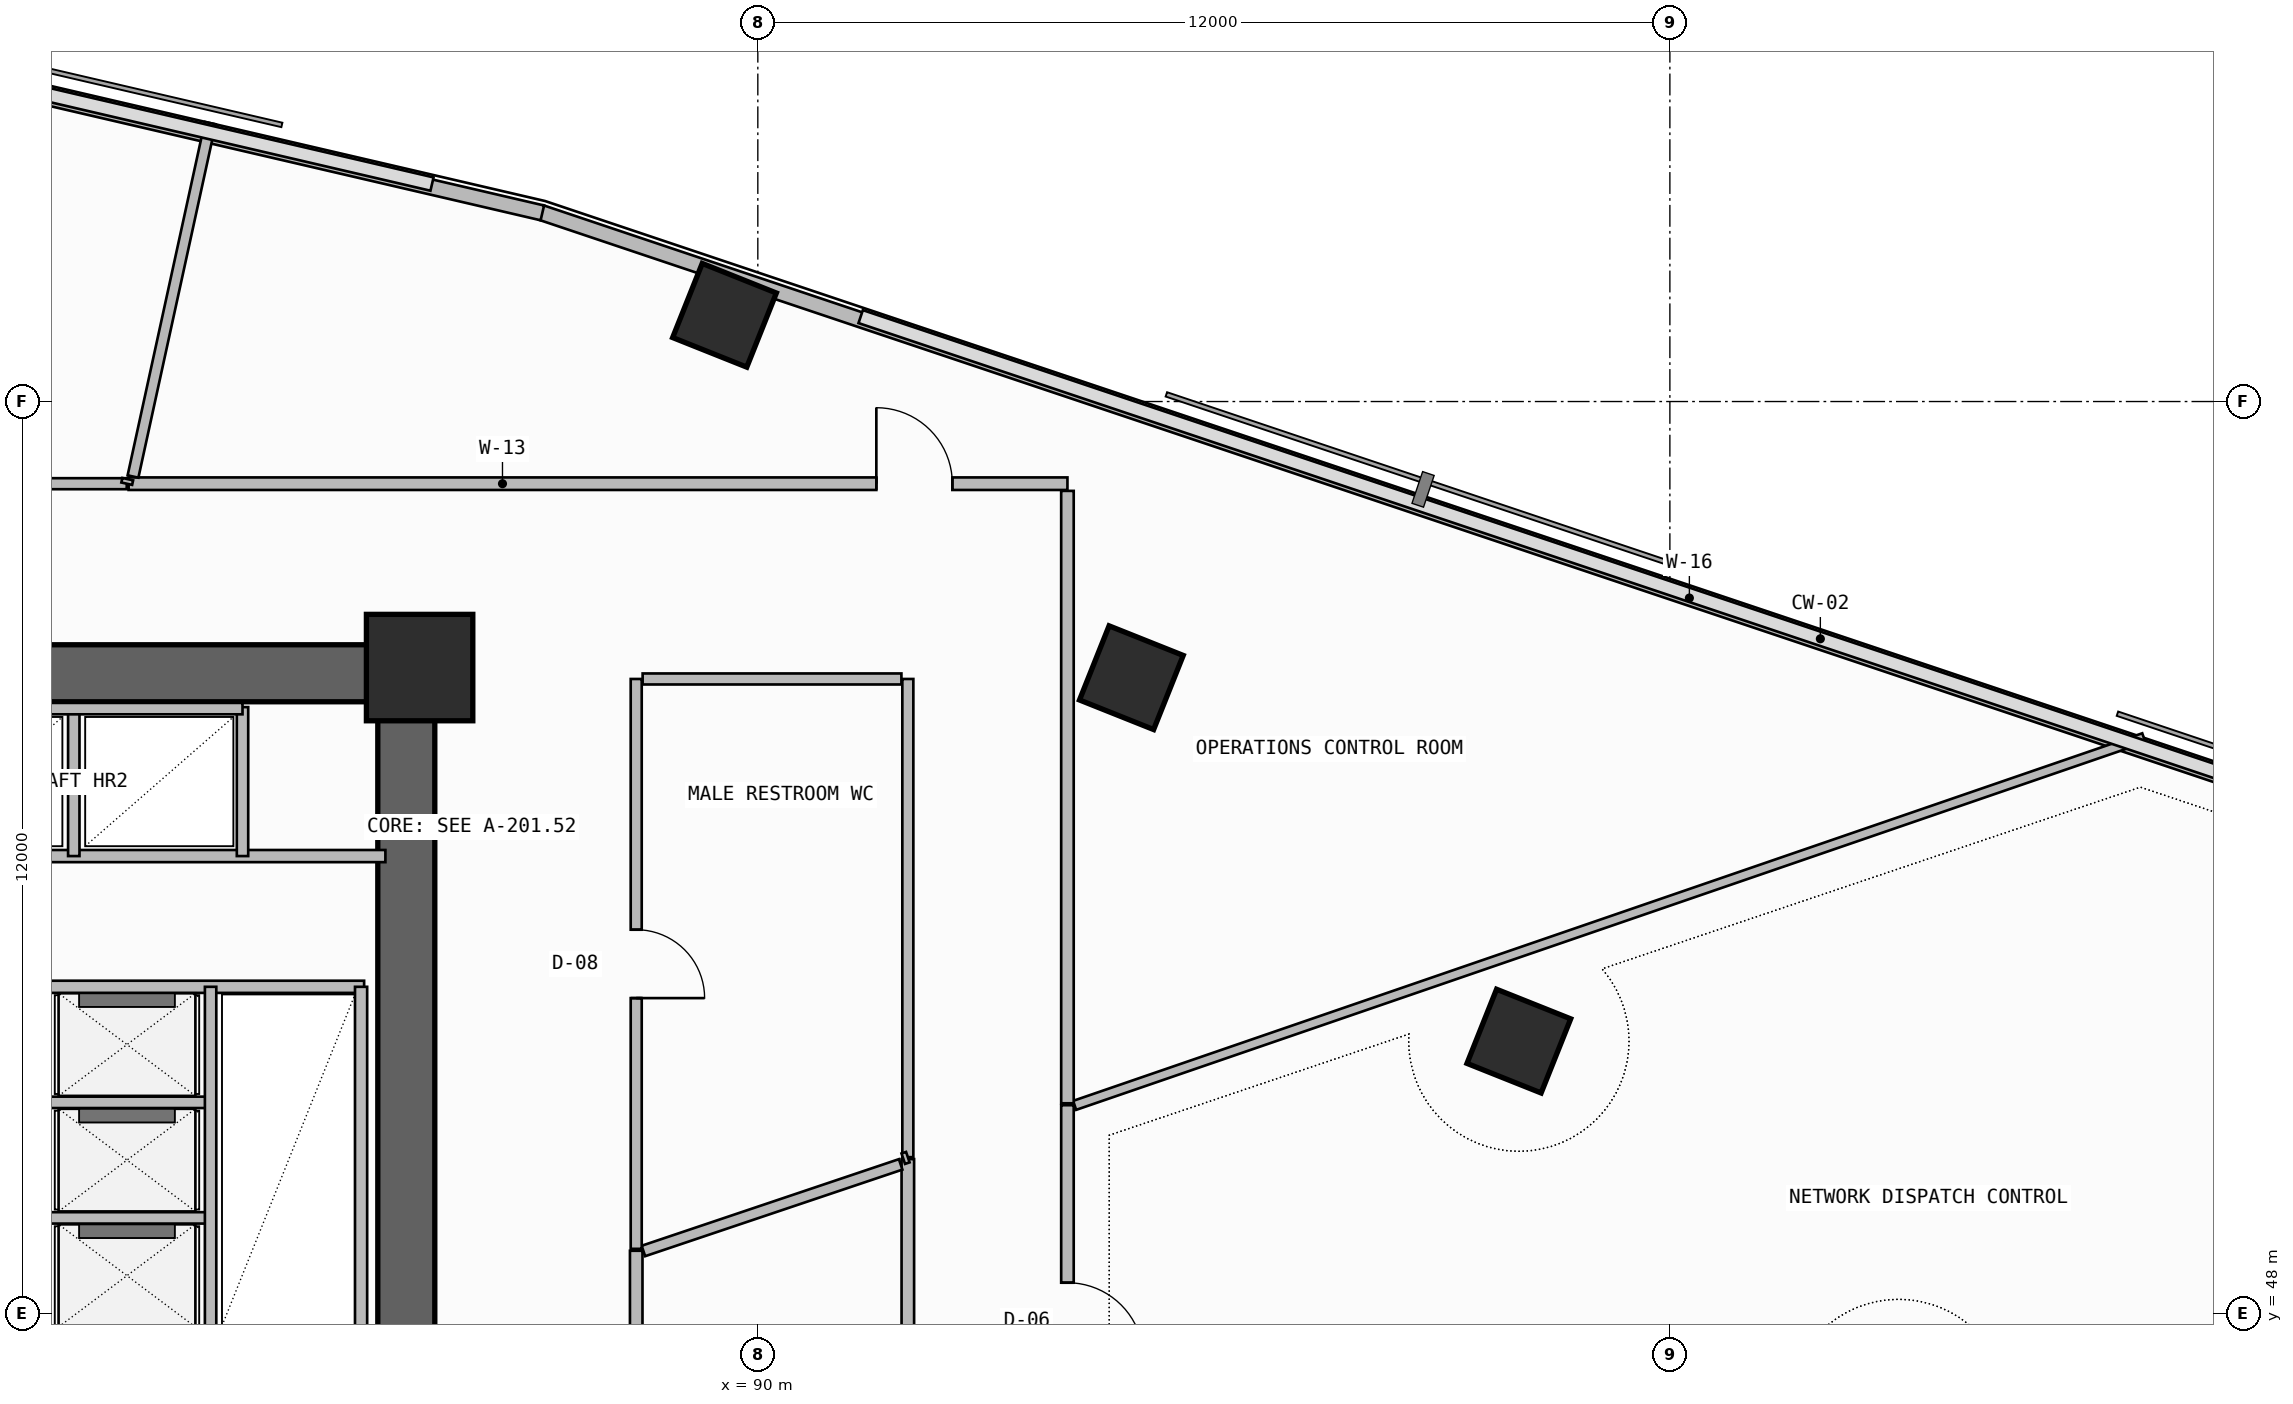
"""IFC4 building model, lengths in metres.
Left out: names, types, materials, properties, quantities, classifications, styles, units other than length and angle.
Written with IfcOpenShell. Run it as: python <this file> out.ifc"""

import sys

from ifc_helpers import new_model, si_unit, direction, frame, frame_2d, origin, origin_2d, place, context, subcontext, project, spatial, rectangle, extrude, element, fill, save


model = new_model("IFC4")
c1 = context("Model", 3, precision=1e-05, world=origin(), true_north=direction((0.0, 1.0)))
c2 = subcontext(c1, "Body", "Model", "MODEL_VIEW")
j1 = project(units=[si_unit("LENGTHUNIT", "METRE"), si_unit("PLANEANGLEUNIT", "RADIAN")], contexts=[c1])
p1 = place(None, origin())
s1 = spatial("IfcSite", under=j1, at=p1, CompositionType="ELEMENT")
p2 = place(p1, origin())
s2 = spatial("IfcBuilding", under=s1, at=p2, CompositionType="ELEMENT")
p3 = place(p2, frame((0.0, 0.0, 186.14)))
s3 = spatial("IfcBuildingStorey", under=s2, at=p3, CompositionType="ELEMENT", Elevation=186.14)
p4 = place(p3, frame((72.0, 56.425, -0.26), z_axis=(0.0, 0.0, 1.0), x_axis=(1.0, 0.0, 0.0)))
e1 = element("IfcWall", 1, at=p4, inside=s3, PredefinedType="SHEAR", context=c2, shape_type="SweptSolid", body=[
    extrude(rectangle(XDim=13.75, YDim=0.75, at=frame_2d((6.875, 0.0))), origin(), (0.0, 0.0, 1.0), 3.52),
])
p5 = place(p3, frame((85.375, 47.6, -0.26), z_axis=(0.0, 0.0, 1.0), x_axis=(0.0, 1.0, 0.0)))
e2 = element("IfcWall", 2, at=p5, inside=s3, PredefinedType="SHEAR", context=c2, shape_type="SweptSolid", body=[
    extrude(rectangle(XDim=8.45, YDim=0.75, at=frame_2d((4.225, 0.0))), origin(), (0.0, 0.0, 1.0), 3.52),
])
p6 = place(p3, frame((85.55, 56.5, 0.0), z_axis=(0.0, 0.0, 1.0), x_axis=(1.0, 0.0, 0.0)))
e3 = element("IfcColumn", 3, at=p6, inside=s3, PredefinedType="COLUMN", context=c2, shape_type="SweptSolid", body=[
    extrude(rectangle(XDim=1.4, YDim=1.4, at=origin_2d()), origin(), (0.0, 0.0, 1.0), 3.52),
])
for number, where, z_axis, x_axis in (
    (4, (100.013, 51.585, 0.0), (0.0, 0.0, 1.0), (0.371, 0.929, 0.0)),
    (5, (94.915, 56.367, 0.0), (0.0, 0.0, 1.0), (0.371, 0.929, 0.0)),
    (6, (89.562, 61.135, 0.0), (0.0, 0.0, 1.0), (0.371, 0.929, 0.0)),
):
    element("IfcColumn", number, at=place(p3, frame(where, z_axis=z_axis, x_axis=x_axis)), inside=s3, PredefinedType="COLUMN", context=c2, shape_type="SweptSolid", body=[
        extrude(rectangle(XDim=1.05, YDim=1.05, at=origin_2d()), origin(), (0.0, 0.0, 1.0), 3.52),
    ])
p7 = place(p3, frame((104.656, 44.269, 0.0), z_axis=(0.0, 0.0, 1.0), x_axis=(0.918789071809, 0.394748833467, 0.0)))
e7 = element("IfcWall", 7, at=p7, inside=s3, PredefinedType="SOLIDWALL", context=c2, shape_type="SweptSolid", body=[
    extrude(rectangle(XDim=13.069, YDim=0.42, at=frame_2d((6.534, 0.0))), origin(), (0.0, 0.0, 1.0), 2.245),
])
p8 = place(p7, frame((2.362, 0.0, 1.2)))
e8 = element("IfcOpeningElement", 8, at=p8, cuts=e7, PredefinedType="OPENING", context=c2, shape_type="SweptSolid", body=[
    extrude(rectangle(XDim=2.4, YDim=0.9, at=frame_2d((1.2, 0.45))), frame((0.0, 0.22, 0.0), z_axis=(0.0, -1.0, 0.0), x_axis=(1.0, 0.0, 0.0)), (0.0, 0.0, 1.0), 0.44),
])
p9 = place(p3, frame((117.363, 52.344, 0.0), z_axis=(0.0, 0.0, 1.0), x_axis=(-0.94800468727, 0.31825636351, 0.0)))
e9 = element("IfcWall", 9, at=p9, inside=s3, PredefinedType="PARAPET", context=c2, shape_type="SweptSolid", body=[
    extrude(rectangle(XDim=31.869, YDim=0.2, at=frame_2d((15.935, 0.0))), origin(), (0.0, 0.0, 1.0), 1.15),
])
p10 = place(p3, frame((87.165, 62.482, 0.0), z_axis=(0.0, 0.0, 1.0), x_axis=(-0.973958631559, 0.226725790352, 0.0)))
e10 = element("IfcWall", 10, at=p10, inside=s3, PredefinedType="PARAPET", context=c2, shape_type="SweptSolid", body=[
    extrude(rectangle(XDim=27.376, YDim=0.2, at=frame_2d((13.688, 0.0))), origin(), (0.0, 0.0, 1.0), 1.15),
])
p11 = place(p3, frame((80.6, 52.3, 0.0), z_axis=(0.0, 0.0, 1.0), x_axis=(1.0, 0.0, 0.0)))
e11 = element("IfcWall", 11, at=p11, inside=s3, PredefinedType="SOLIDWALL", context=c2, shape_type="SweptSolid", body=[
    extrude(rectangle(XDim=4.22, YDim=0.16, at=frame_2d((2.11, 0.0))), origin(), (0.0, 0.0, 1.0), 3.26),
])
for number, where, z_axis, x_axis in (
    (12, (80.6, 49.26, 0.0), (0.0, 0.0, 1.0), (1.0, 0.0, 0.0)),
    (13, (80.6, 50.78, 0.0), (0.0, 0.0, 1.0), (1.0, 0.0, 0.0)),
):
    element("IfcWall", number, at=place(p3, frame(where, z_axis=z_axis, x_axis=x_axis)), inside=s3, PredefinedType="PLUMBINGWALL", context=c2, shape_type="SweptSolid", body=[
        extrude(rectangle(XDim=2.2, YDim=0.15, at=frame_2d((1.1, 0.0))), origin(), (0.0, 0.0, 1.0), 3.26),
    ])
p12 = place(p3, frame((82.8, 47.7, 0.0), z_axis=(0.0, 0.0, 1.0), x_axis=(0.0, 1.0, 0.0)))
e14 = element("IfcWall", 14, at=p12, inside=s3, PredefinedType="PLUMBINGWALL", context=c2, shape_type="SweptSolid", body=[
    extrude(rectangle(XDim=4.6, YDim=0.15, at=frame_2d((2.3, 0.0))), origin(), (0.0, 0.0, 1.0), 3.26),
])
p13 = place(p3, frame((84.78, 47.7, 0.0), z_axis=(0.0, 0.0, 1.0), x_axis=(0.0, 1.0, 0.0)))
e15 = element("IfcWall", 15, at=p13, inside=s3, PredefinedType="SOLIDWALL", context=c2, shape_type="SweptSolid", body=[
    extrude(rectangle(XDim=4.6, YDim=0.16, at=frame_2d((2.3, 0.0))), origin(), (0.0, 0.0, 1.0), 3.26),
])
p14 = place(p3, frame((73.02, 54.02, 0.0), z_axis=(0.0, 0.0, 1.0), x_axis=(1.0, 0.0, 0.0)))
e16 = element("IfcWall", 16, at=p14, inside=s3, PredefinedType="SOLIDWALL", context=c2, shape_type="SweptSolid", body=[
    extrude(rectangle(XDim=12.08, YDim=0.16, at=frame_2d((6.04, 0.0))), origin(), (0.0, 0.0, 1.0), 3.26),
])
p15 = place(p3, frame((81.0, 54.02, 0.0), z_axis=(0.0, 0.0, 1.0), x_axis=(0.0, 1.0, 0.0)))
e17 = element("IfcWall", 17, at=p15, inside=s3, PredefinedType="PLUMBINGWALL", context=c2, shape_type="SweptSolid", body=[
    extrude(rectangle(XDim=1.96, YDim=0.15, at=frame_2d((0.98, 0.0))), origin(), (0.0, 0.0, 1.0), 3.26),
])
p16 = place(p3, frame((83.22, 54.02, 0.0), z_axis=(0.0, 0.0, 1.0), x_axis=(0.0, 1.0, 0.0)))
e18 = element("IfcWall", 18, at=p16, inside=s3, PredefinedType="SOLIDWALL", context=c2, shape_type="SweptSolid", body=[
    extrude(rectangle(XDim=1.96, YDim=0.15, at=frame_2d((0.98, 0.0))), origin(), (0.0, 0.0, 1.0), 3.26),
])
p17 = place(p3, frame((76.52, 55.96, 0.0), z_axis=(0.0, 0.0, 1.0), x_axis=(1.0, 0.0, 0.0)))
e19 = element("IfcWall", 19, at=p17, inside=s3, PredefinedType="SOLIDWALL", context=c2, shape_type="SweptSolid", body=[
    extrude(rectangle(XDim=6.7, YDim=0.15, at=frame_2d((3.35, 0.0))), origin(), (0.0, 0.0, 1.0), 3.26),
])
p18 = place(p3, frame((94.074, 45.072, 0.0), z_axis=(0.0, 0.0, 1.0), x_axis=(0.0, 1.0, 0.0)))
e20 = element("IfcWall", 20, at=p18, inside=s3, PredefinedType="PARTITIONING", context=c2, shape_type="SweptSolid", body=[
    extrude(rectangle(XDim=5.67, YDim=0.165, at=frame_2d((2.835, 0.0))), origin(), (0.0, 0.0, 1.0), 2.745),
])
p19 = place(p18, frame((2.335, 0.0, 0.0)))
e21 = element("IfcOpeningElement", 21, at=p19, cuts=e20, PredefinedType="OPENING", context=c2, shape_type="SweptSolid", body=[
    extrude(rectangle(XDim=1.0, YDim=2.2, at=frame_2d((0.5, 1.1))), frame((0.0, 0.093, 0.0), z_axis=(0.0, -1.0, 0.0), x_axis=(1.0, 0.0, 0.0)), (0.0, 0.0, 1.0), 0.185),
])
p20 = place(p3, frame((94.168, 50.74, 0.0), z_axis=(0.0, 0.0, 1.0), x_axis=(0.945674142281, 0.325116004867, 0.0)))
e22 = element("IfcWall", 22, at=p20, inside=s3, PredefinedType="PARTITIONING", context=c2, shape_type="SweptSolid", body=[
    extrude(rectangle(XDim=14.875, YDim=0.125, at=frame_2d((7.438, 0.0))), origin(), (0.0, 0.0, 1.0), 2.645),
])
p21 = place(p3, frame((88.4, 41.1, 0.0), z_axis=(0.0, 0.0, 1.0), x_axis=(0.0, 1.0, 0.0)))
e23 = element("IfcWall", 23, at=p21, inside=s3, PredefinedType="PARTITIONING", context=c2, shape_type="SweptSolid", body=[
    extrude(rectangle(XDim=7.727, YDim=0.165, at=frame_2d((3.864, 0.0))), origin(), (0.0, 0.0, 1.0), 2.745),
])
p22 = place(p21, frame((3.364, 0.0, 0.0)))
e24 = element("IfcOpeningElement", 24, at=p22, cuts=e23, PredefinedType="OPENING", context=c2, shape_type="SweptSolid", body=[
    extrude(rectangle(XDim=1.0, YDim=2.2, at=frame_2d((0.5, 1.1))), frame((0.0, 0.093, 0.0), z_axis=(0.0, -1.0, 0.0), x_axis=(1.0, 0.0, 0.0)), (0.0, 0.0, 1.0), 0.185),
])
p23 = place(p3, frame((91.974, 50.034, 0.0), z_axis=(0.0, 0.0, 1.0), x_axis=(0.0, -1.0, 0.0)))
e25 = element("IfcWall", 25, at=p23, inside=s3, PredefinedType="PARTITIONING", context=c2, shape_type="SweptSolid", body=[
    extrude(rectangle(XDim=4.887, YDim=0.165, at=frame_2d((2.444, 0.0))), origin(), (0.0, 0.0, 1.0), 3.26),
])
p24 = place(p3, frame((88.494, 48.825, 0.0), z_axis=(0.0, 0.0, 1.0), x_axis=(0.947763274115, 0.318974569895, 0.0)))
e26 = element("IfcWall", 26, at=p24, inside=s3, PredefinedType="PARTITIONING", context=c2, shape_type="SweptSolid", body=[
    extrude(rectangle(XDim=3.571, YDim=0.145, at=frame_2d((1.786, 0.0))), origin(), (0.0, 0.0, 1.0), 3.26),
])
p25 = place(p3, frame((88.4, 48.853, 0.0), z_axis=(0.0, 0.0, 1.0), x_axis=(0.0, 1.0, 0.0)))
e27 = element("IfcWall", 27, at=p25, inside=s3, PredefinedType="PARTITIONING", context=c2, shape_type="SweptSolid", body=[
    extrude(rectangle(XDim=7.497, YDim=0.145, at=frame_2d((3.749, 0.0))), origin(), (0.0, 0.0, 1.0), 2.745),
])
p26 = place(p25, frame((3.299, 0.0, 0.0)))
e28 = element("IfcOpeningElement", 28, at=p26, cuts=e27, PredefinedType="OPENING", context=c2, shape_type="SweptSolid", body=[
    extrude(rectangle(XDim=0.9, YDim=2.1, at=frame_2d((0.45, 1.05))), frame((0.0, 0.083, 0.0), z_axis=(0.0, -1.0, 0.0), x_axis=(1.0, 0.0, 0.0)), (0.0, 0.0, 1.0), 0.165),
])
p27 = place(p3, frame((91.974, 56.35, 0.0), z_axis=(0.0, 0.0, 1.0), x_axis=(0.0, -1.0, 0.0)))
e29 = element("IfcWall", 29, at=p27, inside=s3, PredefinedType="PARTITIONING", context=c2, shape_type="SweptSolid", body=[
    extrude(rectangle(XDim=6.291, YDim=0.145, at=frame_2d((3.146, 0.0))), origin(), (0.0, 0.0, 1.0), 2.745),
])
p28 = place(p3, frame((88.485, 56.35, 0.0), z_axis=(0.0, 0.0, 1.0), x_axis=(1.0, 0.0, 0.0)))
e30 = element("IfcWall", 30, at=p28, inside=s3, PredefinedType="PARTITIONING", context=c2, shape_type="SweptSolid", body=[
    extrude(rectangle(XDim=3.405, YDim=0.145, at=frame_2d((1.702, 0.0))), origin(), (0.0, 0.0, 1.0), 2.745),
])
p29 = place(p3, frame((91.974, 50.059, 0.0), z_axis=(0.0, 0.0, 1.0), x_axis=(-0.948295528016, -0.317388707336, 0.0)))
e31 = element("IfcWall", 31, at=p29, inside=s3, PredefinedType="PARTITIONING", context=c2, shape_type="SweptSolid", body=[
    extrude(rectangle(XDim=0.063, YDim=0.145, at=frame_2d((0.031, 0.0))), origin(), (0.0, 0.0, 1.0), 3.26),
])
p30 = place(p3, frame((94.074, 58.919, 0.0), z_axis=(0.0, 0.0, 1.0), x_axis=(-1.0, 0.0, 0.0)))
e32 = element("IfcWall", 32, at=p30, inside=s3, PredefinedType="PARTITIONING", context=c2, shape_type="SweptSolid", body=[
    extrude(rectangle(XDim=12.352, YDim=0.165, at=frame_2d((6.176, 0.0))), origin(), (0.0, 0.0, 1.0), 2.645),
])
p31 = place(p30, frame((1.514, 0.0, 0.0)))
e33 = element("IfcOpeningElement", 33, at=p31, cuts=e32, PredefinedType="OPENING", context=c2, shape_type="SweptSolid", body=[
    extrude(rectangle(XDim=1.0, YDim=2.2, at=frame_2d((0.5, 1.1))), frame((0.0, 0.093, 0.0), z_axis=(0.0, -1.0, 0.0), x_axis=(1.0, 0.0, 0.0)), (0.0, 0.0, 1.0), 0.185),
])
p32 = place(p3, frame((94.074, 50.768, 0.0), z_axis=(0.0, 0.0, 1.0), x_axis=(0.0, 1.0, 0.0)))
e34 = element("IfcWall", 34, at=p32, inside=s3, PredefinedType="PARTITIONING", context=c2, shape_type="SweptSolid", body=[
    extrude(rectangle(XDim=8.057, YDim=0.165, at=frame_2d((4.028, 0.0))), origin(), (0.0, 0.0, 1.0), 2.645),
])
p33 = place(p3, frame((81.779, 59.013, 0.0), z_axis=(0.0, 0.0, 1.0), x_axis=(0.213583679224, 0.976924772933, 0.0)))
e35 = element("IfcWall", 35, at=p33, inside=s3, PredefinedType="PARTITIONING", context=c2, shape_type="SweptSolid", body=[
    extrude(rectangle(XDim=4.76, YDim=0.145, at=frame_2d((2.38, 0.0))), origin(), (0.0, 0.0, 1.0), 3.26),
])
p34 = place(p3, frame((81.697, 58.919, 0.0), z_axis=(0.0, 0.0, 1.0), x_axis=(-1.0, 0.0, 0.0)))
e36 = element("IfcWall", 36, at=p34, inside=s3, PredefinedType="PARTITIONING", context=c2, shape_type="SweptSolid", body=[
    extrude(rectangle(XDim=6.148, YDim=0.145, at=frame_2d((3.074, 0.0))), origin(), (0.0, 0.0, 1.0), 3.26),
])
p35 = place(p34, frame((2.624, 0.0, 0.0)))
e37 = element("IfcOpeningElement", 37, at=p35, cuts=e36, PredefinedType="OPENING", context=c2, shape_type="SweptSolid", body=[
    extrude(rectangle(XDim=0.9, YDim=2.1, at=frame_2d((0.45, 1.05))), frame((0.0, 0.083, 0.0), z_axis=(0.0, -1.0, 0.0), x_axis=(1.0, 0.0, 0.0)), (0.0, 0.0, 1.0), 0.165),
])
p36 = place(p3, frame((81.71, 58.979, 0.0), z_axis=(0.0, 0.0, 1.0), x_axis=(-0.214407294843, -0.976744343172, 0.0)))
e38 = element("IfcWall", 38, at=p36, inside=s3, PredefinedType="PARTITIONING", context=c2, shape_type="SweptSolid", body=[
    extrude(rectangle(XDim=0.062, YDim=0.145, at=frame_2d((0.031, 0.0))), origin(), (0.0, 0.0, 1.0), 3.26),
])
p37 = place(p19, frame((1.0, 0.0, 0.0), z_axis=(0.0, 0.0, 1.0), x_axis=(-1.0, 0.0, 0.0)))
e39 = element("IfcDoor", 39, at=p37, inside=s3, OperationType="SINGLE_SWING_RIGHT", PredefinedType="DOOR", context=c2, shape_type="SweptSolid", body=[
    extrude(rectangle(XDim=1.0, YDim=2.2, at=frame_2d((0.5, 1.1))), frame((0.0, 0.025, 0.0), z_axis=(0.0, -1.0, 0.0), x_axis=(1.0, 0.0, 0.0)), (0.0, 0.0, 1.0), 0.05),
])
fill(e21, e39)
p38 = place(p26, frame((0.9, 0.0, 0.0), z_axis=(0.0, 0.0, 1.0), x_axis=(-1.0, 0.0, 0.0)))
e40 = element("IfcDoor", 40, at=p38, inside=s3, OperationType="SINGLE_SWING_RIGHT", PredefinedType="DOOR", context=c2, shape_type="SweptSolid", body=[
    extrude(rectangle(XDim=0.9, YDim=2.1, at=frame_2d((0.45, 1.05))), frame((0.0, 0.025, 0.0), z_axis=(0.0, -1.0, 0.0), x_axis=(1.0, 0.0, 0.0)), (0.0, 0.0, 1.0), 0.05),
])
fill(e28, e40)
p39 = place(p31, frame((1.0, 0.0, 0.0), z_axis=(0.0, 0.0, 1.0), x_axis=(-1.0, 0.0, 0.0)))
e41 = element("IfcDoor", 41, at=p39, inside=s3, OperationType="SINGLE_SWING_LEFT", PredefinedType="DOOR", context=c2, shape_type="SweptSolid", body=[
    extrude(rectangle(XDim=1.0, YDim=2.2, at=frame_2d((0.5, 1.1))), frame((0.0, 0.025, 0.0), z_axis=(0.0, -1.0, 0.0), x_axis=(1.0, 0.0, 0.0)), (0.0, 0.0, 1.0), 0.05),
])
fill(e33, e41)
save(model, sys.argv[1])
